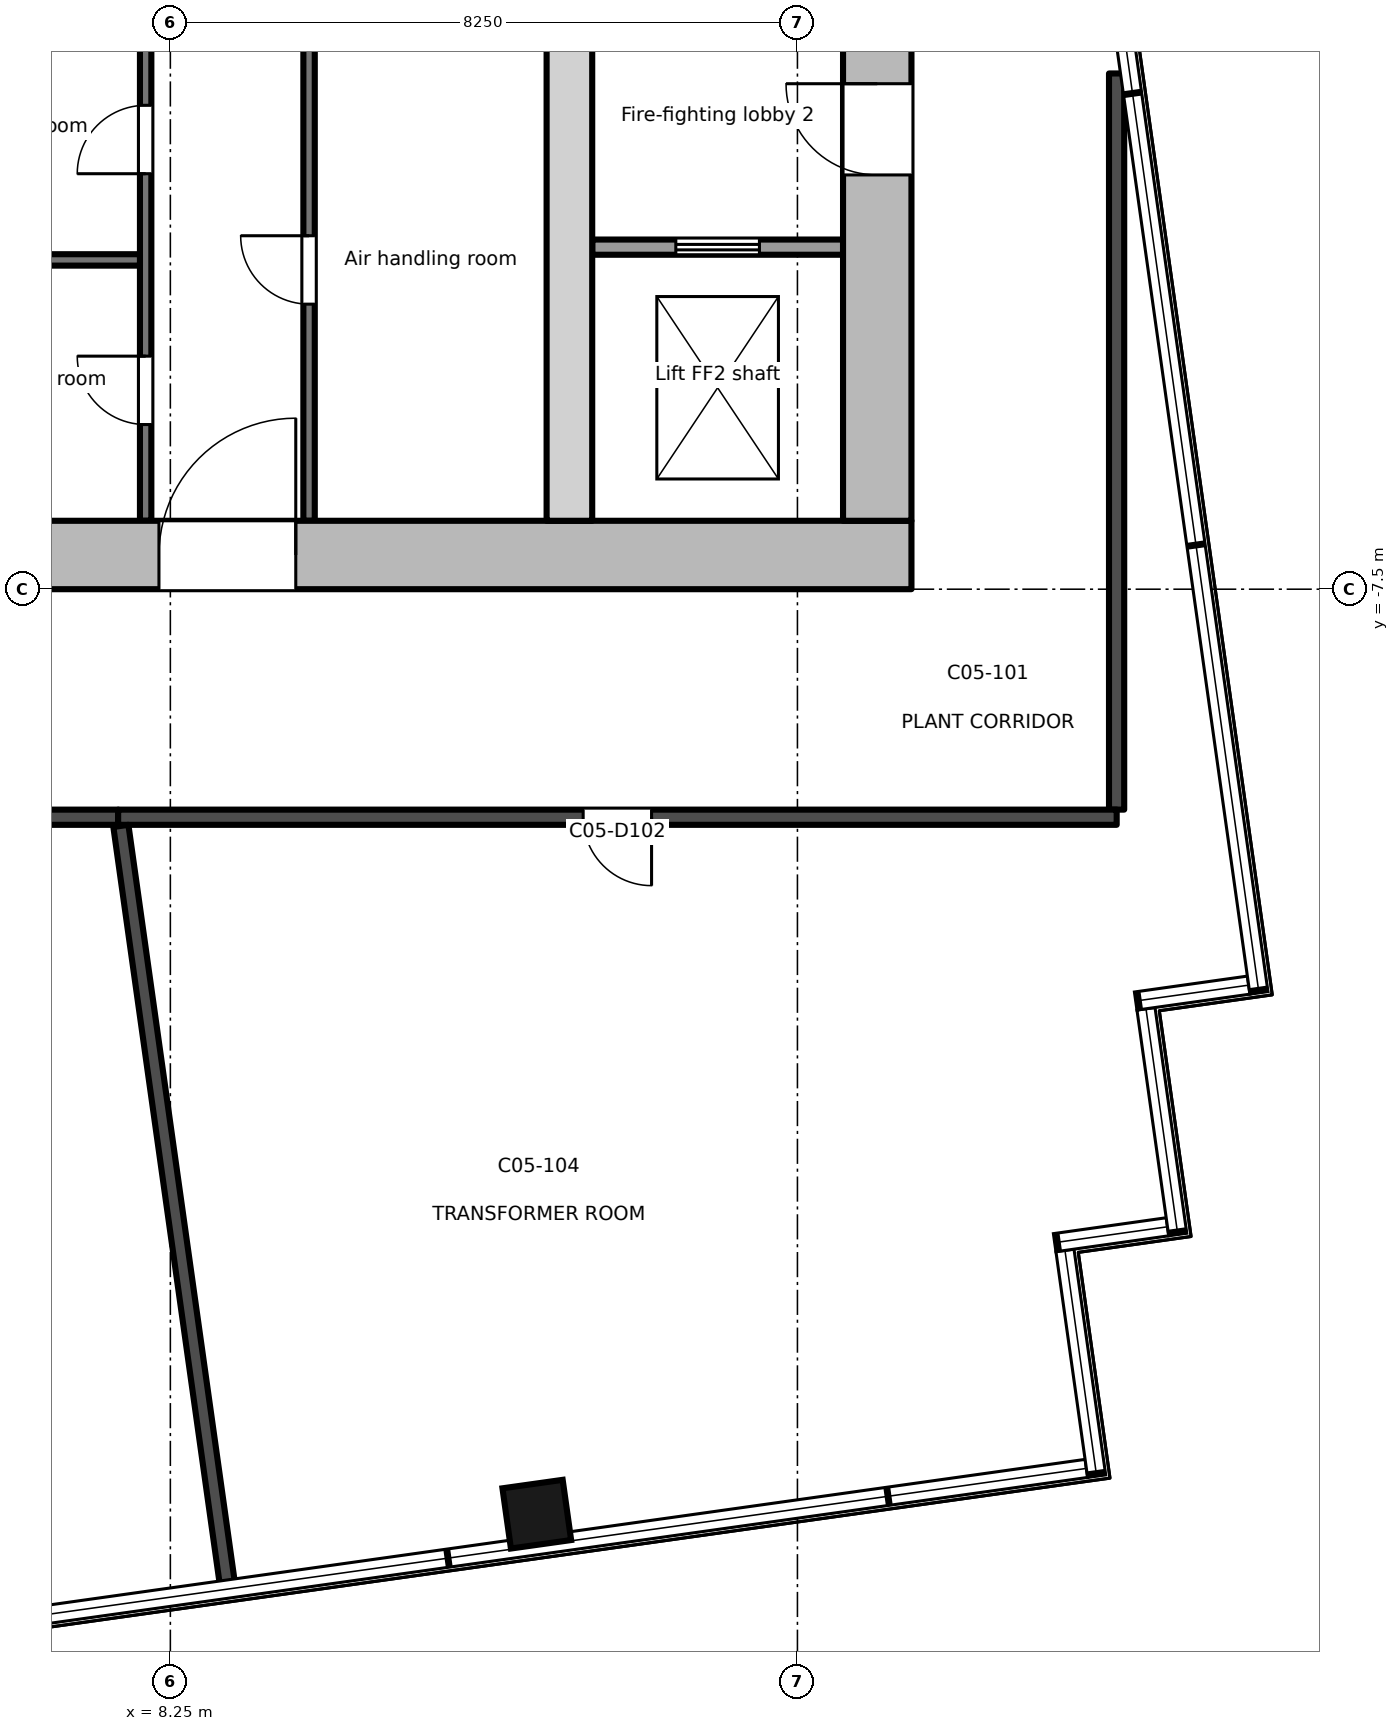
"""IFC4 building model, lengths in metres.
Left out: names, types, materials, properties, quantities, classifications, styles, units other than length and angle.
Written with IfcOpenShell. Run it as: python <this file> out.ifc"""

import sys

from ifc_helpers import new_model, si_unit, direction, frame, frame_2d, origin, origin_2d, place, context, subcontext, project, spatial, rectangle, extrude, element, fill, save


model = new_model("IFC4")
c1 = context("Model", 3, precision=1e-05, world=origin(), true_north=direction((0.0, 1.0)))
c2 = subcontext(c1, "Body", "Model", "MODEL_VIEW")
j1 = project(units=[si_unit("LENGTHUNIT", "METRE"), si_unit("PLANEANGLEUNIT", "RADIAN")], contexts=[c1])
p1 = place(None, origin())
s1 = spatial("IfcSite", under=j1, at=p1, CompositionType="ELEMENT")
p2 = place(p1, origin())
s2 = spatial("IfcBuilding", under=s1, at=p2, CompositionType="ELEMENT")
p3 = place(p2, frame((0.0, 0.0, 308.3)))
s3 = spatial("IfcBuildingStorey", under=s2, at=p3, CompositionType="ELEMENT", Elevation=308.3)
p4 = place(p3, frame((13.071, -19.669, -0.2), z_axis=(0.0, 0.0, 1.0), x_axis=(0.990265639562, 0.139190384377, 0.0)))
e1 = element("IfcColumn", 1, at=p4, inside=s3, PredefinedType="COLUMN", context=c2, shape_type="SweptSolid", body=[
    extrude(rectangle(XDim=0.8, YDim=0.8, at=origin_2d()), origin(), (0.0, 0.0, 1.0), 4.0),
])
p5 = place(p3, frame((-18.0, -7.05, -0.2), z_axis=(0.0, 0.0, 1.0), x_axis=(1.0, 0.0, 0.0)))
e2 = element("IfcWall", 2, at=p5, inside=s3, PredefinedType="SHEAR", context=c2, shape_type="SweptSolid", body=[
    extrude(rectangle(XDim=36.0, YDim=0.9, at=frame_2d((18.0, 0.0))), origin(), (0.0, 0.0, 1.0), 4.0),
])
p6 = place(p5, frame((8.1, 0.0, 0.2)))
e3 = element("IfcOpeningElement", 3, at=p6, cuts=e2, PredefinedType="OPENING", context=c2, shape_type="SweptSolid", body=[
    extrude(rectangle(XDim=1.8, YDim=2.1, at=frame_2d((0.9, 1.05))), frame((0.0, 0.46, 0.0), z_axis=(0.0, -1.0, 0.0), x_axis=(1.0, 0.0, 0.0)), (0.0, 0.0, 1.0), 0.921),
])
p7 = place(p5, frame((17.1, 0.0, 0.2)))
e4 = element("IfcOpeningElement", 4, at=p7, cuts=e2, PredefinedType="OPENING", context=c2, shape_type="SweptSolid", body=[
    extrude(rectangle(XDim=1.8, YDim=2.1, at=frame_2d((0.9, 1.05))), frame((0.0, 0.46, 0.0), z_axis=(0.0, -1.0, 0.0), x_axis=(1.0, 0.0, 0.0)), (0.0, 0.0, 1.0), 0.921),
])
p8 = place(p5, frame((26.1, 0.0, 0.2)))
e5 = element("IfcOpeningElement", 5, at=p8, cuts=e2, PredefinedType="OPENING", context=c2, shape_type="SweptSolid", body=[
    extrude(rectangle(XDim=1.8, YDim=2.1, at=frame_2d((0.9, 1.05))), frame((0.0, 0.46, 0.0), z_axis=(0.0, -1.0, 0.0), x_axis=(1.0, 0.0, 0.0)), (0.0, 0.0, 1.0), 0.921),
])
p9 = place(p3, frame((17.55, -6.6, -0.2), z_axis=(0.0, 0.0, 1.0), x_axis=(0.0, 1.0, 0.0)))
e6 = element("IfcWall", 6, at=p9, inside=s3, PredefinedType="SHEAR", context=c2, shape_type="SweptSolid", body=[
    extrude(rectangle(XDim=13.2, YDim=0.9, at=frame_2d((6.6, 0.0))), origin(), (0.0, 0.0, 1.0), 4.0),
])
p10 = place(p9, frame((4.55, 0.0, 0.2)))
e7 = element("IfcOpeningElement", 7, at=p10, cuts=e6, PredefinedType="OPENING", context=c2, shape_type="SweptSolid", body=[
    extrude(rectangle(XDim=1.2, YDim=2.1, at=frame_2d((0.6, 1.05))), frame((0.0, 0.46, 0.0), z_axis=(0.0, -1.0, 0.0), x_axis=(1.0, 0.0, 0.0)), (0.0, 0.0, 1.0), 0.921),
])
p11 = place(p3, frame((13.5, -6.6, -0.2), z_axis=(0.0, 0.0, 1.0), x_axis=(0.0, 1.0, 0.0)))
e8 = element("IfcWall", 8, at=p11, inside=s3, PredefinedType="SHEAR", context=c2, shape_type="SweptSolid", body=[
    extrude(rectangle(XDim=13.2, YDim=0.6, at=frame_2d((6.6, 0.0))), origin(), (0.0, 0.0, 1.0), 4.0),
])
p12 = place(p3, frame((13.8, -3.0, 0.0), z_axis=(0.0, 0.0, 1.0), x_axis=(1.0, 0.0, 0.0)))
e9 = element("IfcWall", 9, at=p12, inside=s3, PredefinedType="PARTITIONING", context=c2, shape_type="SweptSolid", body=[
    extrude(rectangle(XDim=3.3, YDim=0.2, at=frame_2d((1.65, 0.0))), origin(), (0.0, 0.0, 1.0), 3.8),
])
p13 = place(p12, frame((1.1, 0.0, 0.0)))
e10 = element("IfcOpeningElement", 10, at=p13, cuts=e9, PredefinedType="OPENING", context=c2, shape_type="SweptSolid", body=[
    extrude(rectangle(XDim=1.1, YDim=2.1, at=frame_2d((0.55, 1.05))), frame((0.0, 0.111, 0.0), z_axis=(0.0, -1.0, 0.0), x_axis=(1.0, 0.0, 0.0)), (0.0, 0.0, 1.0), 0.221),
])
p14 = place(p3, frame((7.925, -6.6, 0.0), z_axis=(0.0, 0.0, 1.0), x_axis=(0.0, 1.0, 0.0)))
e11 = element("IfcWall", 11, at=p14, inside=s3, PredefinedType="PARTITIONING", context=c2, shape_type="SweptSolid", body=[
    extrude(rectangle(XDim=13.2, YDim=0.15, at=frame_2d((6.6, 0.0))), origin(), (0.0, 0.0, 1.0), 3.8),
])
p15 = place(p14, frame((1.266, 0.0, 0.0)))
e12 = element("IfcOpeningElement", 12, at=p15, cuts=e11, PredefinedType="OPENING", context=c2, shape_type="SweptSolid", body=[
    extrude(rectangle(XDim=0.9, YDim=2.1, at=frame_2d((0.45, 1.05))), frame((0.0, 0.085, 0.0), z_axis=(0.0, -1.0, 0.0), x_axis=(1.0, 0.0, 0.0)), (0.0, 0.0, 1.0), 0.171),
])
p16 = place(p14, frame((4.566, 0.0, 0.0)))
e13 = element("IfcOpeningElement", 13, at=p16, cuts=e11, PredefinedType="OPENING", context=c2, shape_type="SweptSolid", body=[
    extrude(rectangle(XDim=0.9, YDim=2.1, at=frame_2d((0.45, 1.05))), frame((0.0, 0.085, 0.0), z_axis=(0.0, -1.0, 0.0), x_axis=(1.0, 0.0, 0.0)), (0.0, 0.0, 1.0), 0.171),
])
p17 = place(p14, frame((7.866, 0.0, 0.0)))
e14 = element("IfcOpeningElement", 14, at=p17, cuts=e11, PredefinedType="OPENING", context=c2, shape_type="SweptSolid", body=[
    extrude(rectangle(XDim=0.9, YDim=2.1, at=frame_2d((0.45, 1.05))), frame((0.0, 0.085, 0.0), z_axis=(0.0, -1.0, 0.0), x_axis=(1.0, 0.0, 0.0)), (0.0, 0.0, 1.0), 0.171),
])
p18 = place(p14, frame((11.166, 0.0, 0.0)))
e15 = element("IfcOpeningElement", 15, at=p18, cuts=e11, PredefinedType="OPENING", context=c2, shape_type="SweptSolid", body=[
    extrude(rectangle(XDim=0.9, YDim=2.1, at=frame_2d((0.45, 1.05))), frame((0.0, 0.085, 0.0), z_axis=(0.0, -1.0, 0.0), x_axis=(1.0, 0.0, 0.0)), (0.0, 0.0, 1.0), 0.171),
])
p19 = place(p3, frame((4.8, -3.168, 0.0), z_axis=(0.0, 0.0, 1.0), x_axis=(1.0, 0.0, 0.0)))
e16 = element("IfcWall", 16, at=p19, inside=s3, PredefinedType="PARTITIONING", context=c2, shape_type="SweptSolid", body=[
    extrude(rectangle(XDim=3.05, YDim=0.15, at=frame_2d((1.525, 0.0))), origin(), (0.0, 0.0, 1.0), 3.8),
])
p20 = place(p3, frame((10.075, -6.6, 0.0), z_axis=(0.0, 0.0, 1.0), x_axis=(0.0, 1.0, 0.0)))
e17 = element("IfcWall", 17, at=p20, inside=s3, PredefinedType="PARTITIONING", context=c2, shape_type="SweptSolid", body=[
    extrude(rectangle(XDim=13.2, YDim=0.15, at=frame_2d((6.6, 0.0))), origin(), (0.0, 0.0, 1.0), 3.8),
])
p21 = place(p20, frame((2.85, 0.0, 0.0)))
e18 = element("IfcOpeningElement", 18, at=p21, cuts=e17, PredefinedType="OPENING", context=c2, shape_type="SweptSolid", body=[
    extrude(rectangle(XDim=0.9, YDim=2.1, at=frame_2d((0.45, 1.05))), frame((0.0, 0.085, 0.0), z_axis=(0.0, -1.0, 0.0), x_axis=(1.0, 0.0, 0.0)), (0.0, 0.0, 1.0), 0.171),
])
p22 = place(p20, frame((9.45, 0.0, 0.0)))
e19 = element("IfcOpeningElement", 19, at=p22, cuts=e17, PredefinedType="OPENING", context=c2, shape_type="SweptSolid", body=[
    extrude(rectangle(XDim=0.9, YDim=2.1, at=frame_2d((0.45, 1.05))), frame((0.0, 0.085, 0.0), z_axis=(0.0, -1.0, 0.0), x_axis=(1.0, 0.0, 0.0)), (0.0, 0.0, 1.0), 0.171),
])
p23 = place(p3, frame((7.563, -10.5, 0.0), z_axis=(0.0, 0.0, 1.0), x_axis=(-1.0, 0.0, 0.0)))
e20 = element("IfcWall", 20, at=p23, inside=s3, PredefinedType="PARTITIONING", context=c2, shape_type="SweptSolid", body=[
    extrude(rectangle(XDim=11.768, YDim=0.2, at=frame_2d((5.884, 0.0))), origin(), (0.0, 0.0, 1.0), 3.19),
])
p24 = place(p23, frame((5.434, 0.0, 0.0)))
e21 = element("IfcOpeningElement", 21, at=p24, cuts=e20, PredefinedType="OPENING", context=c2, shape_type="SweptSolid", body=[
    extrude(rectangle(XDim=0.9, YDim=2.1, at=frame_2d((0.45, 1.05))), frame((0.0, 0.111, 0.0), z_axis=(0.0, -1.0, 0.0), x_axis=(1.0, 0.0, 0.0)), (0.0, 0.0, 1.0), 0.221),
])
p25 = place(p3, frame((20.699, -0.715, 0.0), z_axis=(0.0, 0.0, 1.0), x_axis=(0.0, -1.0, 0.0)))
e22 = element("IfcWall", 22, at=p25, inside=s3, PredefinedType="PARTITIONING", context=c2, shape_type="SweptSolid", body=[
    extrude(rectangle(XDim=9.685, YDim=0.2, at=frame_2d((4.842, 0.0))), origin(), (0.0, 0.0, 1.0), 3.8),
])
p26 = place(p3, frame((20.7, -10.5, 0.0), z_axis=(0.0, 0.0, 1.0), x_axis=(-1.0, 0.0, 0.0)))
e23 = element("IfcWall", 23, at=p26, inside=s3, PredefinedType="PARTITIONING", context=c2, shape_type="SweptSolid", body=[
    extrude(rectangle(XDim=13.137, YDim=0.2, at=frame_2d((6.568, 0.0))), origin(), (0.0, 0.0, 1.0), 3.19),
])
p27 = place(p26, frame((6.119, 0.0, 0.0)))
e24 = element("IfcOpeningElement", 24, at=p27, cuts=e23, PredefinedType="OPENING", context=c2, shape_type="SweptSolid", body=[
    extrude(rectangle(XDim=0.9, YDim=2.1, at=frame_2d((0.45, 1.05))), frame((0.0, 0.111, 0.0), z_axis=(0.0, -1.0, 0.0), x_axis=(1.0, 0.0, 0.0)), (0.0, 0.0, 1.0), 0.221),
])
p28 = place(p3, frame((7.599, -10.614, 0.0), z_axis=(0.0, 0.0, 1.0), x_axis=(0.139131599901, -0.990273900448, 0.0)))
e25 = element("IfcWall", 25, at=p28, inside=s3, PredefinedType="PARTITIONING", context=c2, shape_type="SweptSolid", body=[
    extrude(rectangle(XDim=10.048, YDim=0.2, at=frame_2d((5.024, 0.0))), origin(), (0.0, 0.0, 1.0), 3.19),
])
p29 = place(p13, origin())
e26 = element("IfcDoor", 26, at=p29, inside=s3, OperationType="DOUBLE_DOOR_SLIDING", PredefinedType="DOOR", context=c2, shape_type="SweptSolid", body=[
    extrude(rectangle(XDim=1.1, YDim=2.1, at=frame_2d((0.55, 1.05))), frame((0.0, 0.025, 0.0), z_axis=(0.0, -1.0, 0.0), x_axis=(1.0, 0.0, 0.0)), (0.0, 0.0, 1.0), 0.05),
])
fill(e10, e26)
p30 = place(p10, origin())
e27 = element("IfcDoor", 27, at=p30, inside=s3, OperationType="SINGLE_SWING_RIGHT", PredefinedType="DOOR", context=c2, shape_type="SweptSolid", body=[
    extrude(rectangle(XDim=1.2, YDim=2.1, at=frame_2d((0.6, 1.05))), frame((0.0, 0.025, 0.0), z_axis=(0.0, -1.0, 0.0), x_axis=(1.0, 0.0, 0.0)), (0.0, 0.0, 1.0), 0.05),
])
fill(e7, e27)
p31 = place(p15, origin())
e28 = element("IfcDoor", 28, at=p31, inside=s3, OperationType="SINGLE_SWING_RIGHT", PredefinedType="DOOR", context=c2, shape_type="SweptSolid", body=[
    extrude(rectangle(XDim=0.9, YDim=2.1, at=frame_2d((0.45, 1.05))), frame((0.0, 0.025, 0.0), z_axis=(0.0, -1.0, 0.0), x_axis=(1.0, 0.0, 0.0)), (0.0, 0.0, 1.0), 0.05),
])
fill(e12, e28)
p32 = place(p16, origin())
e29 = element("IfcDoor", 29, at=p32, inside=s3, OperationType="SINGLE_SWING_LEFT", PredefinedType="DOOR", context=c2, shape_type="SweptSolid", body=[
    extrude(rectangle(XDim=0.9, YDim=2.1, at=frame_2d((0.45, 1.05))), frame((0.0, 0.025, 0.0), z_axis=(0.0, -1.0, 0.0), x_axis=(1.0, 0.0, 0.0)), (0.0, 0.0, 1.0), 0.05),
])
fill(e13, e29)
p33 = place(p21, origin())
e30 = element("IfcDoor", 30, at=p33, inside=s3, OperationType="SINGLE_SWING_RIGHT", PredefinedType="DOOR", context=c2, shape_type="SweptSolid", body=[
    extrude(rectangle(XDim=0.9, YDim=2.1, at=frame_2d((0.45, 1.05))), frame((0.0, 0.025, 0.0), z_axis=(0.0, -1.0, 0.0), x_axis=(1.0, 0.0, 0.0)), (0.0, 0.0, 1.0), 0.05),
])
fill(e18, e30)
p34 = place(p8, origin())
e31 = element("IfcDoor", 31, at=p34, inside=s3, OperationType="SINGLE_SWING_RIGHT", PredefinedType="DOOR", context=c2, shape_type="SweptSolid", body=[
    extrude(rectangle(XDim=1.8, YDim=2.1, at=frame_2d((0.9, 1.05))), frame((0.0, 0.025, 0.0), z_axis=(0.0, -1.0, 0.0), x_axis=(1.0, 0.0, 0.0)), (0.0, 0.0, 1.0), 0.05),
])
fill(e5, e31)
p35 = place(p27, origin())
e32 = element("IfcDoor", 32, at=p35, inside=s3, OperationType="SINGLE_SWING_LEFT", PredefinedType="DOOR", context=c2, shape_type="SweptSolid", body=[
    extrude(rectangle(XDim=0.9, YDim=2.1, at=frame_2d((0.45, 1.05))), frame((0.0, 0.025, 0.0), z_axis=(0.0, -1.0, 0.0), x_axis=(1.0, 0.0, 0.0)), (0.0, 0.0, 1.0), 0.05),
])
fill(e24, e32)
save(model, sys.argv[1])
